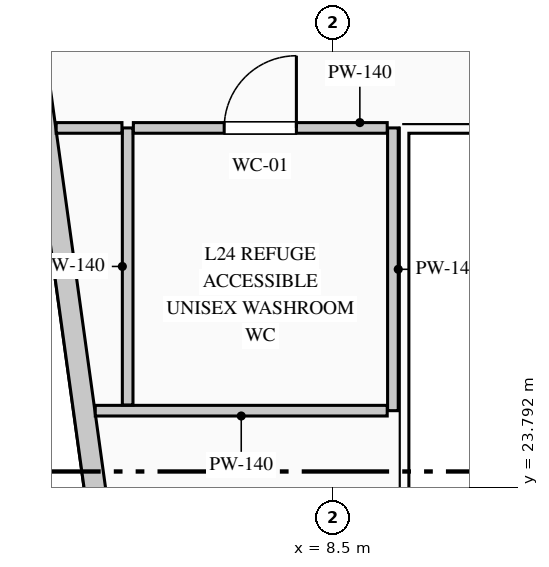
"""IFC4 building model, lengths in metres.
Left out: names, types, materials, properties, quantities, classifications, styles, units other than length and angle.
Written with IfcOpenShell. Run it as: python <this file> out.ifc"""

import sys

from ifc_helpers import new_model, si_unit, direction, frame, frame_2d, origin, place, context, subcontext, project, spatial, rectangle, extrude, element, fill, save


model = new_model("IFC4")
c1 = context("Model", 3, precision=1e-05, world=origin(), true_north=direction((0.0, 1.0)))
c2 = subcontext(c1, "Body", "Model", "MODEL_VIEW")
j1 = project(units=[si_unit("LENGTHUNIT", "METRE"), si_unit("PLANEANGLEUNIT", "RADIAN")], contexts=[c1])
p1 = place(None, origin())
s1 = spatial("IfcSite", under=j1, at=p1, CompositionType="ELEMENT")
p2 = place(p1, origin())
s2 = spatial("IfcBuilding", under=s1, at=p2, CompositionType="ELEMENT")
p3 = place(p2, frame((0.0, 0.0, 106.2)))
s3 = spatial("IfcBuildingStorey", under=s2, at=p3, CompositionType="ELEMENT", Elevation=106.2)
p4 = place(p3, frame((8.002, 4.74, 0.0), z_axis=(0.0, 0.0, 1.0), x_axis=(-0.136991218313, 0.99057226193, 0.0)))
e1 = element("IfcWall", 1, at=p4, inside=s3, PredefinedType="STANDARD", context=c2, shape_type="SweptSolid", body=[
    extrude(rectangle(XDim=36.868, YDim=0.28, at=frame_2d((18.434, 0.0))), origin(), (0.0, 0.0, 1.0), 4.94),
])
p5 = place(p3, frame((9.29, 28.52, 0.0), z_axis=(0.0, 0.0, 1.0), x_axis=(0.0, -1.0, 0.0)))
e2 = element("IfcWall", 2, at=p5, inside=s3, PredefinedType="PARTITIONING", context=c2, shape_type="SweptSolid", body=[
    extrude(rectangle(XDim=3.72, YDim=0.14, at=frame_2d((1.86, 0.0))), origin(), (0.0, 0.0, 1.0), 4.565),
])
p6 = place(p3, frame((9.215, 24.8, 0.0), z_axis=(0.0, 0.0, 1.0), x_axis=(-1.0, 0.0, 0.0)))
e3 = element("IfcWall", 3, at=p6, inside=s3, PredefinedType="PARTITIONING", context=c2, shape_type="SweptSolid", body=[
    extrude(rectangle(XDim=3.841, YDim=0.14, at=frame_2d((1.921, 0.0))), origin(), (0.0, 0.0, 1.0), 4.94),
])
p7 = place(p3, frame((5.8, 24.875, 0.0), z_axis=(0.0, 0.0, 1.0), x_axis=(0.0, 1.0, 0.0)))
e4 = element("IfcWall", 4, at=p7, inside=s3, PredefinedType="PARTITIONING", context=c2, shape_type="SweptSolid", body=[
    extrude(rectangle(XDim=3.645, YDim=0.14, at=frame_2d((1.823, 0.0))), origin(), (0.0, 0.0, 1.0), 4.94),
])
p8 = place(p3, frame((4.859, 28.52, 0.0), z_axis=(0.0, 0.0, 1.0), x_axis=(1.0, 0.0, 0.0)))
e5 = element("IfcWall", 5, at=p8, inside=s3, PredefinedType="PARTITIONING", context=c2, shape_type="SweptSolid", body=[
    extrude(rectangle(XDim=0.866, YDim=0.14, at=frame_2d((0.433, 0.0))), origin(), (0.0, 0.0, 1.0), 4.94),
])
p9 = place(p3, frame((5.875, 28.52, 0.0), z_axis=(0.0, 0.0, 1.0), x_axis=(1.0, 0.0, 0.0)))
e6 = element("IfcWall", 6, at=p9, inside=s3, PredefinedType="PARTITIONING", context=c2, shape_type="SweptSolid", body=[
    extrude(rectangle(XDim=3.34, YDim=0.14, at=frame_2d((1.67, 0.0))), origin(), (0.0, 0.0, 1.0), 4.94),
])
p10 = place(p9, frame((1.195, 0.0, 0.0)))
e7 = element("IfcOpeningElement", 7, at=p10, cuts=e6, PredefinedType="OPENING", context=c2, shape_type="SweptSolid", body=[
    extrude(rectangle(XDim=0.95, YDim=2.15, at=frame_2d((0.475, 1.075))), frame((0.0, 0.08, 0.0), z_axis=(0.0, -1.0, 0.0), x_axis=(1.0, 0.0, 0.0)), (0.0, 0.0, 1.0), 0.16),
])
p11 = place(p10, origin())
e8 = element("IfcDoor", 8, at=p11, inside=s3, OperationType="SINGLE_SWING_RIGHT", PredefinedType="DOOR", context=c2, shape_type="SweptSolid", body=[
    extrude(rectangle(XDim=0.95, YDim=2.15, at=frame_2d((0.475, 1.075))), frame((0.0, 0.025, 0.0), z_axis=(0.0, -1.0, 0.0), x_axis=(1.0, 0.0, 0.0)), (0.0, 0.0, 1.0), 0.05),
])
fill(e7, e8)
save(model, sys.argv[1])
